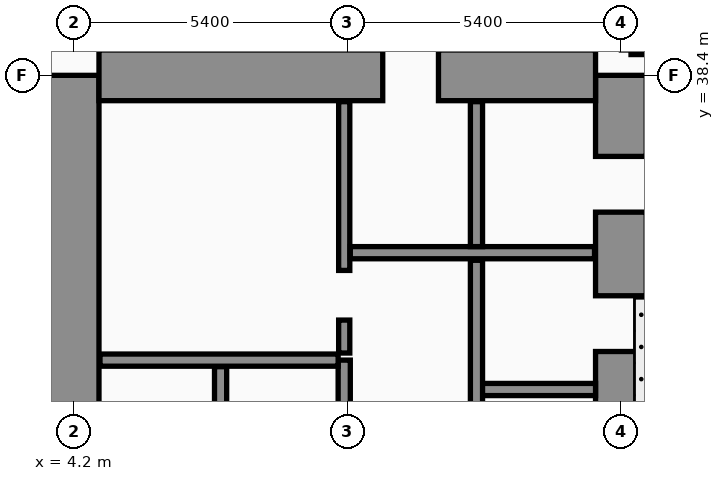
"""IFC4 building model, lengths in metres.
Left out: names, types, materials, properties, quantities, classifications, styles, units other than length and angle.
Written with IfcOpenShell. Run it as: python <this file> out.ifc"""

import sys

from ifc_helpers import new_model, si_unit, direction, frame, frame_2d, origin, place, context, subcontext, project, spatial, rectangle, extrude, element, fill, save


model = new_model("IFC4")
c1 = context("Model", 3, precision=1e-05, world=origin(), true_north=direction((0.0, 1.0)))
c2 = subcontext(c1, "Body", "Model", "MODEL_VIEW")
j1 = project(units=[si_unit("LENGTHUNIT", "METRE"), si_unit("PLANEANGLEUNIT", "RADIAN")], contexts=[c1])
p1 = place(None, origin())
s1 = spatial("IfcSite", under=j1, at=p1, CompositionType="ELEMENT")
p2 = place(p1, origin())
s2 = spatial("IfcBuilding", under=s1, at=p2, CompositionType="ELEMENT")
p3 = place(p2, origin())
s3 = spatial("IfcBuildingStorey", under=s2, at=p3, CompositionType="ELEMENT", Elevation=0.0)
p4 = place(p3, frame((4.2, 16.8, 0.0), z_axis=(0.0, 0.0, 1.0), x_axis=(0.0, 1.0, 0.0)))
e1 = element("IfcWall", 1, at=p4, inside=s3, PredefinedType="SHEAR", context=c2, shape_type="SweptSolid", body=[
    extrude(rectangle(XDim=21.6, YDim=1.0, at=frame_2d((10.8, 0.0))), origin(), (0.0, 0.0, 1.0), 5.68),
])
p5 = place(p3, frame((15.0, 16.8, 0.0), z_axis=(0.0, 0.0, 1.0), x_axis=(0.0, 1.0, 0.0)))
e2 = element("IfcWall", 2, at=p5, inside=s3, PredefinedType="SHEAR", context=c2, shape_type="SweptSolid", body=[
    extrude(rectangle(XDim=21.6, YDim=1.0, at=frame_2d((10.8, 0.0))), origin(), (0.0, 0.0, 1.0), 5.68),
])
p6 = place(p5, frame((8.65, 0.0, 0.0)))
e3 = element("IfcOpeningElement", 3, at=p6, cuts=e2, PredefinedType="OPENING", context=c2, shape_type="SweptSolid", body=[
    extrude(rectangle(XDim=1.1, YDim=2.2, at=frame_2d((0.55, 1.1))), frame((0.0, 0.51, 0.0), z_axis=(0.0, -1.0, 0.0), x_axis=(1.0, 0.0, 0.0)), (0.0, 0.0, 1.0), 1.02),
])
p7 = place(p5, frame((1.25, 0.0, 0.0)))
e4 = element("IfcOpeningElement", 4, at=p7, cuts=e2, PredefinedType="OPENING", context=c2, shape_type="SweptSolid", body=[
    extrude(rectangle(XDim=1.1, YDim=2.2, at=frame_2d((0.55, 1.1))), frame((0.0, 0.51, 0.0), z_axis=(0.0, -1.0, 0.0), x_axis=(1.0, 0.0, 0.0)), (0.0, 0.0, 1.0), 1.02),
])
p8 = place(p5, frame((3.8, 0.0, 0.0)))
e5 = element("IfcOpeningElement", 5, at=p8, cuts=e2, PredefinedType="OPENING", context=c2, shape_type="SweptSolid", body=[
    extrude(rectangle(XDim=1.1, YDim=2.2, at=frame_2d((0.55, 1.1))), frame((0.0, 0.51, 0.0), z_axis=(0.0, -1.0, 0.0), x_axis=(1.0, 0.0, 0.0)), (0.0, 0.0, 1.0), 1.02),
])
p9 = place(p5, frame((6.35, 0.0, 0.0)))
e6 = element("IfcOpeningElement", 6, at=p9, cuts=e2, PredefinedType="OPENING", context=c2, shape_type="SweptSolid", body=[
    extrude(rectangle(XDim=1.1, YDim=2.2, at=frame_2d((0.55, 1.1))), frame((0.0, 0.51, 0.0), z_axis=(0.0, -1.0, 0.0), x_axis=(1.0, 0.0, 0.0)), (0.0, 0.0, 1.0), 1.02),
])
p10 = place(p5, frame((10.85, 0.0, 0.0)))
e7 = element("IfcOpeningElement", 7, at=p10, cuts=e2, PredefinedType="OPENING", context=c2, shape_type="SweptSolid", body=[
    extrude(rectangle(XDim=1.1, YDim=2.2, at=frame_2d((0.55, 1.1))), frame((0.0, 0.51, 0.0), z_axis=(0.0, -1.0, 0.0), x_axis=(1.0, 0.0, 0.0)), (0.0, 0.0, 1.0), 1.02),
])
p11 = place(p5, frame((13.5, 0.0, 0.0)))
e8 = element("IfcOpeningElement", 8, at=p11, cuts=e2, PredefinedType="OPENING", context=c2, shape_type="SweptSolid", body=[
    extrude(rectangle(XDim=1.1, YDim=2.2, at=frame_2d((0.55, 1.1))), frame((0.0, 0.51, 0.0), z_axis=(0.0, -1.0, 0.0), x_axis=(1.0, 0.0, 0.0)), (0.0, 0.0, 1.0), 1.02),
])
p12 = place(p5, frame((16.15, 0.0, 0.0)))
e9 = element("IfcOpeningElement", 9, at=p12, cuts=e2, PredefinedType="OPENING", context=c2, shape_type="SweptSolid", body=[
    extrude(rectangle(XDim=1.1, YDim=2.2, at=frame_2d((0.55, 1.1))), frame((0.0, 0.51, 0.0), z_axis=(0.0, -1.0, 0.0), x_axis=(1.0, 0.0, 0.0)), (0.0, 0.0, 1.0), 1.02),
])
p13 = place(p5, frame((18.9, 0.0, 0.0)))
e10 = element("IfcOpeningElement", 10, at=p13, cuts=e2, PredefinedType="OPENING", context=c2, shape_type="SweptSolid", body=[
    extrude(rectangle(XDim=1.1, YDim=2.2, at=frame_2d((0.55, 1.1))), frame((0.0, 0.51, 0.0), z_axis=(0.0, -1.0, 0.0), x_axis=(1.0, 0.0, 0.0)), (0.0, 0.0, 1.0), 1.02),
])
p14 = place(p3, frame((4.7, 38.4, 0.0), z_axis=(0.0, 0.0, 1.0), x_axis=(1.0, 0.0, 0.0)))
e11 = element("IfcWall", 11, at=p14, inside=s3, PredefinedType="SHEAR", context=c2, shape_type="SweptSolid", body=[
    extrude(rectangle(XDim=9.8, YDim=1.0, at=frame_2d((4.9, 0.0))), origin(), (0.0, 0.0, 1.0), 5.68),
])
p15 = place(p14, frame((5.6, 0.0, 0.0)))
e12 = element("IfcOpeningElement", 12, at=p15, cuts=e11, PredefinedType="OPENING", context=c2, shape_type="SweptSolid", body=[
    extrude(rectangle(XDim=1.1, YDim=2.2, at=frame_2d((0.55, 1.1))), frame((0.0, 0.51, 0.0), z_axis=(0.0, -1.0, 0.0), x_axis=(1.0, 0.0, 0.0)), (0.0, 0.0, 1.0), 1.02),
])
p16 = place(p3, frame((12.18, 32.2, 0.0), z_axis=(0.0, 0.0, 1.0), x_axis=(1.0, 0.0, 0.0)))
e13 = element("IfcWall", 13, at=p16, inside=s3, PredefinedType="SOLIDWALL", context=c2, shape_type="SweptSolid", body=[
    extrude(rectangle(XDim=2.32, YDim=0.24, at=frame_2d((1.16, 0.0))), origin(), (0.0, 0.0, 1.0), 5.68),
])
p17 = place(p3, frame((7.1, 30.02, 0.0), z_axis=(0.0, 0.0, 1.0), x_axis=(0.0, 1.0, 0.0)))
e14 = element("IfcWall", 14, at=p17, inside=s3, PredefinedType="SOLIDWALL", context=c2, shape_type="SweptSolid", body=[
    extrude(rectangle(XDim=2.63, YDim=0.24, at=frame_2d((1.315, 0.0))), origin(), (0.0, 0.0, 1.0), 5.68),
])
p18 = place(p3, frame((9.54, 29.88, 0.0), z_axis=(0.0, 0.0, 1.0), x_axis=(0.0, 1.0, 0.0)))
e15 = element("IfcWall", 15, at=p18, inside=s3, PredefinedType="SOLIDWALL", context=c2, shape_type="SweptSolid", body=[
    extrude(rectangle(XDim=2.9, YDim=0.24, at=frame_2d((1.45, 0.0))), origin(), (0.0, 0.0, 1.0), 5.68),
])
p19 = place(p18, frame((0.7, 0.0, 0.0)))
e16 = element("IfcOpeningElement", 16, at=p19, cuts=e15, PredefinedType="OPENING", context=c2, shape_type="SweptSolid", body=[
    extrude(rectangle(XDim=1.3, YDim=2.35, at=frame_2d((0.65, 1.175))), frame((0.0, 0.13, 0.0), z_axis=(0.0, -1.0, 0.0), x_axis=(1.0, 0.0, 0.0)), (0.0, 0.0, 1.0), 0.26),
])
p20 = place(p3, frame((4.72, 32.78, 0.0), z_axis=(0.0, 0.0, 1.0), x_axis=(1.0, 0.0, 0.0)))
e17 = element("IfcWall", 17, at=p20, inside=s3, PredefinedType="SOLIDWALL", context=c2, shape_type="SweptSolid", body=[
    extrude(rectangle(XDim=4.7, YDim=0.24, at=frame_2d((2.35, 0.0))), origin(), (0.0, 0.0, 1.0), 5.68),
])
p21 = place(p3, frame((9.54, 32.92, 0.0), z_axis=(0.0, 0.0, 1.0), x_axis=(0.0, 1.0, 0.0)))
e18 = element("IfcWall", 18, at=p21, inside=s3, PredefinedType="SOLIDWALL", context=c2, shape_type="SweptSolid", body=[
    extrude(rectangle(XDim=4.96, YDim=0.22, at=frame_2d((2.48, 0.0))), origin(), (0.0, 0.0, 1.0), 5.68),
])
p22 = place(p21, frame((0.65, 0.0, 0.0)))
e19 = element("IfcOpeningElement", 19, at=p22, cuts=e18, PredefinedType="OPENING", context=c2, shape_type="SweptSolid", body=[
    extrude(rectangle(XDim=0.98, YDim=2.15, at=frame_2d((0.49, 1.075))), frame((0.0, 0.12, 0.0), z_axis=(0.0, -1.0, 0.0), x_axis=(1.0, 0.0, 0.0)), (0.0, 0.0, 1.0), 0.24),
])
p23 = place(p3, frame((12.15, 27.0, 0.0), z_axis=(0.0, 0.0, 1.0), x_axis=(0.0, 1.0, 0.0)))
e20 = element("IfcWall", 20, at=p23, inside=s3, PredefinedType="SOLIDWALL", context=c2, shape_type="SweptSolid", body=[
    extrude(rectangle(XDim=7.75, YDim=0.24, at=frame_2d((3.875, 0.0))), origin(), (0.0, 0.0, 1.0), 5.68),
])
p24 = place(p3, frame((9.66, 34.9, 0.0), z_axis=(0.0, 0.0, 1.0), x_axis=(1.0, 0.0, 0.0)))
e21 = element("IfcWall", 21, at=p24, inside=s3, PredefinedType="SOLIDWALL", context=c2, shape_type="SweptSolid", body=[
    extrude(rectangle(XDim=4.82, YDim=0.24, at=frame_2d((2.41, 0.0))), origin(), (0.0, 0.0, 1.0), 5.68),
])
p25 = place(p3, frame((12.15, 35.02, 0.0), z_axis=(0.0, 0.0, 1.0), x_axis=(0.0, 1.0, 0.0)))
e22 = element("IfcWall", 22, at=p25, inside=s3, PredefinedType="SOLIDWALL", context=c2, shape_type="SweptSolid", body=[
    extrude(rectangle(XDim=2.86, YDim=0.24, at=frame_2d((1.43, 0.0))), origin(), (0.0, 0.0, 1.0), 5.68),
])
p26 = place(p3, frame((15.2, 38.9, 0.0), z_axis=(0.0, 0.0, 1.0), x_axis=(1.0, 0.0, 0.0)))
e23 = element("IfcWall", 23, at=p26, inside=s3, PredefinedType="PARTITIONING", context=c2, shape_type="SweptSolid", body=[
    extrude(rectangle(XDim=18.1, YDim=0.18, at=frame_2d((9.05, 0.0))), origin(), (0.0, 0.0, 1.0), 4.88),
])
p27 = place(p26, frame((2.2, 0.0, 0.0)))
e24 = element("IfcOpeningElement", 24, at=p27, cuts=e23, PredefinedType="OPENING", context=c2, shape_type="SweptSolid", body=[
    extrude(rectangle(XDim=1.02, YDim=2.2, at=frame_2d((0.51, 1.1))), frame((0.0, 0.1, 0.0), z_axis=(0.0, -1.0, 0.0), x_axis=(1.0, 0.0, 0.0)), (0.0, 0.0, 1.0), 0.2),
])
p28 = place(p26, frame((8.2, 0.0, 0.0)))
e25 = element("IfcOpeningElement", 25, at=p28, cuts=e23, PredefinedType="OPENING", context=c2, shape_type="SweptSolid", body=[
    extrude(rectangle(XDim=1.02, YDim=2.2, at=frame_2d((0.51, 1.1))), frame((0.0, 0.1, 0.0), z_axis=(0.0, -1.0, 0.0), x_axis=(1.0, 0.0, 0.0)), (0.0, 0.0, 1.0), 0.2),
])
p29 = place(p26, frame((14.2, 0.0, 0.0)))
e26 = element("IfcOpeningElement", 26, at=p29, cuts=e23, PredefinedType="OPENING", context=c2, shape_type="SweptSolid", body=[
    extrude(rectangle(XDim=1.02, YDim=2.2, at=frame_2d((0.51, 1.1))), frame((0.0, 0.1, 0.0), z_axis=(0.0, -1.0, 0.0), x_axis=(1.0, 0.0, 0.0)), (0.0, 0.0, 1.0), 0.2),
])
p30 = place(p22, origin())
e27 = element("IfcDoor", 27, at=p30, inside=s3, OperationType="SINGLE_SWING_LEFT", PredefinedType="DOOR", context=c2, shape_type="SweptSolid", body=[
    extrude(rectangle(XDim=0.98, YDim=2.15, at=frame_2d((0.49, 1.075))), frame((0.0, 0.025, 0.0), z_axis=(0.0, -1.0, 0.0), x_axis=(1.0, 0.0, 0.0)), (0.0, 0.0, 1.0), 0.05),
])
fill(e19, e27)
p31 = place(p12, origin())
e28 = element("IfcDoor", 28, at=p31, inside=s3, OperationType="DOUBLE_DOOR_SLIDING", PredefinedType="DOOR", context=c2, shape_type="SweptSolid", body=[
    extrude(rectangle(XDim=1.1, YDim=2.2, at=frame_2d((0.55, 1.1))), frame((0.0, 0.025, 0.0), z_axis=(0.0, -1.0, 0.0), x_axis=(1.0, 0.0, 0.0)), (0.0, 0.0, 1.0), 0.05),
])
fill(e9, e28)
p32 = place(p13, origin())
e29 = element("IfcDoor", 29, at=p32, inside=s3, OperationType="DOUBLE_DOOR_SLIDING", PredefinedType="DOOR", context=c2, shape_type="SweptSolid", body=[
    extrude(rectangle(XDim=1.1, YDim=2.2, at=frame_2d((0.55, 1.1))), frame((0.0, 0.025, 0.0), z_axis=(0.0, -1.0, 0.0), x_axis=(1.0, 0.0, 0.0)), (0.0, 0.0, 1.0), 0.05),
])
fill(e10, e29)
p33 = place(p15, origin())
e30 = element("IfcDoor", 30, at=p33, inside=s3, OperationType="DOUBLE_DOOR_SLIDING", PredefinedType="DOOR", context=c2, shape_type="SweptSolid", body=[
    extrude(rectangle(XDim=1.1, YDim=2.2, at=frame_2d((0.55, 1.1))), frame((0.0, 0.025, 0.0), z_axis=(0.0, -1.0, 0.0), x_axis=(1.0, 0.0, 0.0)), (0.0, 0.0, 1.0), 0.05),
])
fill(e12, e30)
save(model, sys.argv[1])
